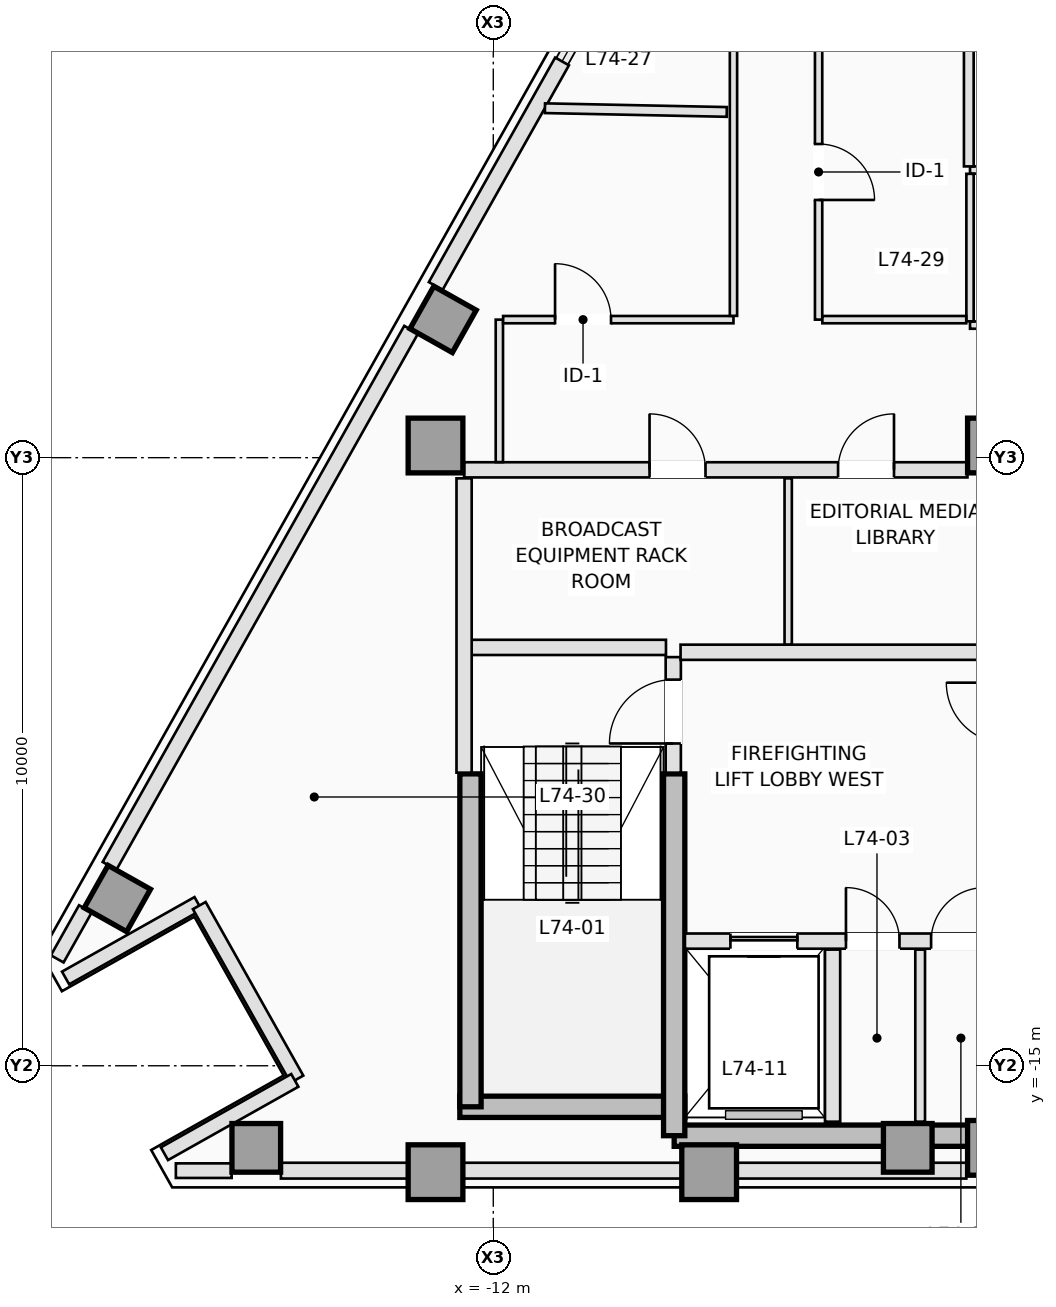
"""IFC4 building model, lengths in metres.
Left out: names, types, materials, properties, quantities, classifications, styles, units other than length and angle.
Written with IfcOpenShell. Run it as: python <this file> out.ifc"""

import sys

from ifc_helpers import new_model, si_unit, direction, frame, frame_2d, origin, origin_2d, place, context, subcontext, project, spatial, rectangle, extrude, element, fill, save


model = new_model("IFC4")
c1 = context("Model", 3, precision=1e-05, world=origin(), true_north=direction((0.0, 1.0)))
c2 = subcontext(c1, "Body", "Model", "MODEL_VIEW")
j1 = project(units=[si_unit("LENGTHUNIT", "METRE"), si_unit("PLANEANGLEUNIT", "RADIAN")], contexts=[c1])
p1 = place(None, origin())
s1 = spatial("IfcSite", under=j1, at=p1, CompositionType="ELEMENT")
p2 = place(p1, origin())
s2 = spatial("IfcBuilding", under=s1, at=p2, CompositionType="ELEMENT")
p3 = place(p2, frame((0.0, 0.0, 267.4)))
s3 = spatial("IfcBuildingStorey", under=s2, at=p3, CompositionType="ELEMENT", Elevation=267.4)
p4 = place(p3, frame((-12.55, -15.675, 0.0), z_axis=(0.0, 0.0, 1.0), x_axis=(1.0, 0.0, 0.0)))
e1 = element("IfcWall", 1, at=p4, inside=s3, PredefinedType="SHEAR", context=c2, shape_type="SweptSolid", body=[
    extrude(rectangle(XDim=3.7, YDim=0.35, at=frame_2d((1.85, 0.0))), origin(), (0.0, 0.0, 1.0), 3.5),
])
p5 = place(p3, frame((-9.025, -16.15, 0.0), z_axis=(0.0, 0.0, 1.0), x_axis=(1.0, 0.0, 0.0)))
e2 = element("IfcWall", 2, at=p5, inside=s3, PredefinedType="SHEAR", context=c2, shape_type="SweptSolid", body=[
    extrude(rectangle(XDim=5.275, YDim=0.35, at=frame_2d((2.637, 0.0))), origin(), (0.0, 0.0, 1.0), 3.5),
])
p6 = place(p3, frame((-12.375, -15.675, 0.0), z_axis=(0.0, 0.0, 1.0), x_axis=(0.0, 1.0, 0.0)))
e3 = element("IfcWall", 3, at=p6, inside=s3, PredefinedType="SHEAR", context=c2, shape_type="SweptSolid", body=[
    extrude(rectangle(XDim=5.475, YDim=0.35, at=frame_2d((2.738, 0.0))), origin(), (0.0, 0.0, 1.0), 3.5),
])
p7 = place(p3, frame((-9.025, -16.15, 0.0), z_axis=(0.0, 0.0, 1.0), x_axis=(0.0, 1.0, 0.0)))
e4 = element("IfcWall", 4, at=p7, inside=s3, PredefinedType="SHEAR", context=c2, shape_type="SweptSolid", body=[
    extrude(rectangle(XDim=5.95, YDim=0.35, at=frame_2d((2.975, 0.0))), origin(), (0.0, 0.0, 1.0), 3.5),
])
for number, where, z_axis, x_axis in (
    (5, (-12.95, -16.75, 0.0), (0.0, 0.0, 1.0), (1.0, 0.0, 0.0)),
    (6, (-8.45, -16.75, 0.0), (0.0, 0.0, 1.0), (1.0, 0.0, 0.0)),
    (7, (-3.75, -16.35, 0.0), (0.0, 0.0, 1.0), (1.0, 0.0, 0.0)),
    (8, (-12.95, -4.8, 0.0), (0.0, 0.0, 1.0), (1.0, 0.0, 0.0)),
    (9, (-3.75, -4.8, 0.0), (0.0, 0.0, 1.0), (1.0, 0.0, 0.0)),
):
    element("IfcColumn", number, at=place(p3, frame(where, z_axis=z_axis, x_axis=x_axis)), inside=s3, PredefinedType="COLUMN", context=c2, shape_type="SweptSolid", body=[
        extrude(rectangle(XDim=0.9, YDim=0.9, at=origin_2d()), origin(), (0.0, 0.0, 1.0), 3.5),
    ])
for number, where, z_axis, x_axis in (
    (10, (-15.898, -16.35, 0.0), (0.0, 0.0, 1.0), (0.0, 1.0, 0.0)),
    (11, (-5.184, -16.35, 0.0), (0.0, 0.0, 1.0), (0.0, 1.0, 0.0)),
    (12, (-12.825, -2.727, 0.0), (0.0, 0.0, 1.0), (-0.872, 0.49, 0.0)),
    (13, (-18.182, -12.25, 0.0), (0.0, 0.0, 1.0), (-0.872, 0.49, 0.0)),
):
    element("IfcColumn", number, at=place(p3, frame(where, z_axis=z_axis, x_axis=x_axis)), inside=s3, PredefinedType="COLUMN", context=c2, shape_type="SweptSolid", body=[
        extrude(rectangle(XDim=0.8, YDim=0.8, at=origin_2d()), origin(), (0.0, 0.0, 1.0), 3.5),
    ])
p8 = place(p3, frame((-16.302, -16.725, 0.0), z_axis=(0.0, 0.0, 1.0), x_axis=(-1.0, 0.0, 0.0)))
e14 = element("IfcWall", 14, at=p8, inside=s3, PredefinedType="STANDARD", context=c2, shape_type="SweptSolid", body=[
    extrude(rectangle(XDim=0.917, YDim=0.24, at=frame_2d((0.459, 0.0))), origin(), (0.0, 0.0, 1.0), 3.18),
])
p9 = place(p3, frame((-4.22, -16.725, 0.0), z_axis=(0.0, 0.0, 1.0), x_axis=(-1.0, 0.0, 0.0)))
e15 = element("IfcWall", 15, at=p9, inside=s3, PredefinedType="STANDARD", context=c2, shape_type="SweptSolid", body=[
    extrude(rectangle(XDim=11.273, YDim=0.26, at=frame_2d((5.636, 0.0))), origin(), (0.0, 0.0, 1.0), 2.72),
])
p10 = place(p3, frame((-19.171, -13.242, 0.0), z_axis=(0.0, 0.0, 1.0), x_axis=(0.490199895283, 0.871610040479, 0.0)))
e16 = element("IfcWall", 16, at=p10, inside=s3, PredefinedType="STANDARD", context=c2, shape_type="SweptSolid", body=[
    extrude(rectangle(XDim=0.945, YDim=0.24, at=frame_2d((0.472, 0.0))), origin(), (0.0, 0.0, 1.0), 3.18),
])
p11 = place(p3, frame((-18.311, -11.713, 0.0), z_axis=(0.0, 0.0, 1.0), x_axis=(0.490266968583, 0.871572314565, 0.0)))
e17 = element("IfcWall", 17, at=p11, inside=s3, PredefinedType="STANDARD", context=c2, shape_type="SweptSolid", body=[
    extrude(rectangle(XDim=10.116, YDim=0.26, at=frame_2d((5.058, 0.0))), origin(), (0.0, 0.0, 1.0), 3.18),
])
p12 = place(p3, frame((-12.946, -2.177, 0.0), z_axis=(0.0, 0.0, 1.0), x_axis=(0.490244825075, 0.871584770109, 0.0)))
e18 = element("IfcWall", 18, at=p12, inside=s3, PredefinedType="STANDARD", context=c2, shape_type="SweptSolid", body=[
    extrude(rectangle(XDim=4.237, YDim=0.26, at=frame_2d((2.119, 0.0))), origin(), (0.0, 0.0, 1.0), 3.18),
])
p13 = place(p3, frame((-19.033, -13.556, 0.0), z_axis=(0.0, 0.0, 1.0), x_axis=(0.871588577066, 0.490238056792, 0.0)))
e19 = element("IfcWall", 19, at=p13, inside=s3, PredefinedType="STANDARD", context=c2, shape_type="SweptSolid", body=[
    extrude(rectangle(XDim=2.5, YDim=0.24, at=frame_2d((1.25, 0.0))), origin(), (0.0, 0.0, 1.0), 3.18),
])
p14 = place(p3, frame((-16.835, -12.366, 0.0), z_axis=(0.0, 0.0, 1.0), x_axis=(0.490293083368, -0.871557624258, 0.0)))
e20 = element("IfcWall", 20, at=p14, inside=s3, PredefinedType="STANDARD", context=c2, shape_type="SweptSolid", body=[
    extrude(rectangle(XDim=3.276, YDim=0.24, at=frame_2d((1.638, 0.0))), origin(), (0.0, 0.0, 1.0), 2.72),
])
p15 = place(p3, frame((-15.264, -15.24, 0.0), z_axis=(0.0, 0.0, 1.0), x_axis=(-0.87157023615, -0.490270663468, 0.0)))
e21 = element("IfcWall", 21, at=p15, inside=s3, PredefinedType="STANDARD", context=c2, shape_type="SweptSolid", body=[
    extrude(rectangle(XDim=2.46, YDim=0.24, at=frame_2d((1.23, 0.0))), origin(), (0.0, 0.0, 1.0), 3.18),
])
p16 = place(p3, frame((-9.04, -10.18, 0.0), z_axis=(0.0, 0.0, 1.0), x_axis=(0.0, 1.0, 0.0)))
e22 = element("IfcWall", 22, at=p16, inside=s3, PredefinedType="PARTITIONING", context=c2, shape_type="SweptSolid", body=[
    extrude(rectangle(XDim=1.9, YDim=0.25, at=frame_2d((0.95, 0.0))), origin(), (0.0, 0.0, 1.0), 3.18),
])
p17 = place(p16, frame((0.48, 0.0, 0.0)))
e23 = element("IfcOpeningElement", 23, at=p17, cuts=e22, PredefinedType="OPENING", context=c2, shape_type="SweptSolid", body=[
    extrude(rectangle(XDim=1.05, YDim=2.15, at=frame_2d((0.525, 1.075))), frame((0.0, 0.135, 0.0), z_axis=(0.0, -1.0, 0.0), x_axis=(1.0, 0.0, 0.0)), (0.0, 0.0, 1.0), 0.27),
])
p18 = place(p3, frame((-12.38, -8.12, 0.0), z_axis=(0.0, 0.0, 1.0), x_axis=(1.0, 0.0, 0.0)))
e24 = element("IfcWall", 24, at=p18, inside=s3, PredefinedType="PARTITIONING", context=c2, shape_type="SweptSolid", body=[
    extrude(rectangle(XDim=3.22, YDim=0.25, at=frame_2d((1.61, 0.0))), origin(), (0.0, 0.0, 1.0), 3.18),
])
p19 = place(p3, frame((-12.48, -10.18, 0.0), z_axis=(0.0, 0.0, 1.0), x_axis=(0.0, 1.0, 0.0)))
e25 = element("IfcWall", 25, at=p19, inside=s3, PredefinedType="PARTITIONING", context=c2, shape_type="SweptSolid", body=[
    extrude(rectangle(XDim=4.84, YDim=0.25, at=frame_2d((2.42, 0.0))), origin(), (0.0, 0.0, 1.0), 3.18),
])
p20 = place(p3, frame((-8.848, -12.95, 0.0), z_axis=(0.0, 0.0, 1.0), x_axis=(1.0, 0.0, 0.0)))
e26 = element("IfcWall", 26, at=p20, inside=s3, PredefinedType="PARTITIONING", context=c2, shape_type="SweptSolid", body=[
    extrude(rectangle(XDim=5.168, YDim=0.25, at=frame_2d((2.584, 0.0))), origin(), (0.0, 0.0, 1.0), 3.18),
])
p21 = place(p20, frame((0.748, 0.0, 0.0)))
e27 = element("IfcOpeningElement", 27, at=p21, cuts=e26, PredefinedType="OPENING", context=c2, shape_type="SweptSolid", body=[
    extrude(rectangle(XDim=1.1, YDim=2.15, at=frame_2d((0.55, 1.075))), frame((0.0, 0.135, 0.0), z_axis=(0.0, -1.0, 0.0), x_axis=(1.0, 0.0, 0.0)), (0.0, 0.0, 1.0), 0.27),
])
p22 = place(p20, frame((2.648, 0.0, 0.0)))
e28 = element("IfcOpeningElement", 28, at=p22, cuts=e26, PredefinedType="OPENING", context=c2, shape_type="SweptSolid", body=[
    extrude(rectangle(XDim=0.88, YDim=2.1, at=frame_2d((0.44, 1.05))), frame((0.0, 0.135, 0.0), z_axis=(0.0, -1.0, 0.0), x_axis=(1.0, 0.0, 0.0)), (0.0, 0.0, 1.0), 0.27),
])
p23 = place(p20, frame((4.048, 0.0, 0.0)))
e29 = element("IfcOpeningElement", 29, at=p23, cuts=e26, PredefinedType="OPENING", context=c2, shape_type="SweptSolid", body=[
    extrude(rectangle(XDim=0.88, YDim=2.1, at=frame_2d((0.44, 1.05))), frame((0.0, 0.135, 0.0), z_axis=(0.0, -1.0, 0.0), x_axis=(1.0, 0.0, 0.0)), (0.0, 0.0, 1.0), 0.27),
])
p24 = place(p3, frame((-6.42, -15.92, 0.0), z_axis=(0.0, 0.0, 1.0), x_axis=(0.0, 1.0, 0.0)))
e30 = element("IfcWall", 30, at=p24, inside=s3, PredefinedType="PARTITIONING", context=c2, shape_type="SweptSolid", body=[
    extrude(rectangle(XDim=2.83, YDim=0.25, at=frame_2d((1.415, 0.0))), origin(), (0.0, 0.0, 1.0), 3.18),
])
p25 = place(p3, frame((-4.98, -15.92, 0.0), z_axis=(0.0, 0.0, 1.0), x_axis=(0.0, 1.0, 0.0)))
e31 = element("IfcWall", 31, at=p25, inside=s3, PredefinedType="PARTITIONING", context=c2, shape_type="SweptSolid", body=[
    extrude(rectangle(XDim=2.83, YDim=0.16, at=frame_2d((1.415, 0.0))), origin(), (0.0, 0.0, 1.0), 3.18),
])
p26 = place(p3, frame((-8.92, -8.2, 0.0), z_axis=(0.0, 0.0, 1.0), x_axis=(1.0, 0.0, 0.0)))
e32 = element("IfcWall", 32, at=p26, inside=s3, PredefinedType="PARTITIONING", context=c2, shape_type="SweptSolid", body=[
    extrude(rectangle(XDim=5.24, YDim=0.25, at=frame_2d((2.62, 0.0))), origin(), (0.0, 0.0, 1.0), 3.18),
])
p27 = place(p3, frame((-12.48, -5.2, 0.0), z_axis=(0.0, 0.0, 1.0), x_axis=(1.0, 0.0, 0.0)))
e33 = element("IfcWall", 33, at=p27, inside=s3, PredefinedType="PARTITIONING", context=c2, shape_type="SweptSolid", body=[
    extrude(rectangle(XDim=8.278, YDim=0.25, at=frame_2d((4.139, 0.0))), origin(), (0.0, 0.0, 1.0), 3.18),
])
p28 = place(p27, frame((3.05, 0.0, 0.0)))
e34 = element("IfcOpeningElement", 34, at=p28, cuts=e33, PredefinedType="OPENING", context=c2, shape_type="SweptSolid", body=[
    extrude(rectangle(XDim=0.92, YDim=2.12, at=frame_2d((0.46, 1.06))), frame((0.0, 0.135, 0.0), z_axis=(0.0, -1.0, 0.0), x_axis=(1.0, 0.0, 0.0)), (0.0, 0.0, 1.0), 0.27),
])
p29 = place(p27, frame((6.15, 0.0, 0.0)))
e35 = element("IfcOpeningElement", 35, at=p29, cuts=e33, PredefinedType="OPENING", context=c2, shape_type="SweptSolid", body=[
    extrude(rectangle(XDim=0.92, YDim=2.12, at=frame_2d((0.46, 1.06))), frame((0.0, 0.135, 0.0), z_axis=(0.0, -1.0, 0.0), x_axis=(1.0, 0.0, 0.0)), (0.0, 0.0, 1.0), 0.27),
])
p30 = place(p3, frame((-7.15, -8.073, 0.0), z_axis=(0.0, 0.0, 1.0), x_axis=(0.0, 1.0, 0.0)))
e36 = element("IfcWall", 36, at=p30, inside=s3, PredefinedType="PARTITIONING", context=c2, shape_type="SweptSolid", body=[
    extrude(rectangle(XDim=2.733, YDim=0.12, at=frame_2d((1.366, 0.0))), origin(), (0.0, 0.0, 1.0), 3.18),
])
p31 = place(p3, frame((-4.16, -2.82, 0.0), z_axis=(0.0, 0.0, 1.0), x_axis=(1.0, 0.0, 0.0)))
e37 = element("IfcWall", 37, at=p31, inside=s3, PredefinedType="PARTITIONING", context=c2, shape_type="SweptSolid", body=[
    extrude(rectangle(XDim=2.62, YDim=0.12, at=frame_2d((1.31, 0.0))), origin(), (0.0, 0.0, 1.0), 2.873),
])
p32 = place(p31, frame((0.82, 0.0, 0.0)))
e38 = element("IfcOpeningElement", 38, at=p32, cuts=e37, PredefinedType="OPENING", context=c2, shape_type="SweptSolid", body=[
    extrude(rectangle(XDim=0.9, YDim=2.12, at=frame_2d((0.45, 1.06))), frame((0.0, 0.07, 0.0), z_axis=(0.0, -1.0, 0.0), x_axis=(1.0, 0.0, 0.0)), (0.0, 0.0, 1.0), 0.14),
])
p33 = place(p3, frame((-4.16, -0.27, 0.0), z_axis=(0.0, 0.0, 1.0), x_axis=(1.0, 0.0, 0.0)))
e39 = element("IfcWall", 39, at=p33, inside=s3, PredefinedType="PARTITIONING", context=c2, shape_type="SweptSolid", body=[
    extrude(rectangle(XDim=2.62, YDim=0.12, at=frame_2d((1.31, 0.0))), origin(), (0.0, 0.0, 1.0), 3.18),
])
p34 = place(p3, frame((-4.16, -2.758, 0.0), z_axis=(0.0, 0.0, 1.0), x_axis=(0.0, 1.0, 0.0)))
e40 = element("IfcWall", 40, at=p34, inside=s3, PredefinedType="PARTITIONING", context=c2, shape_type="SweptSolid", body=[
    extrude(rectangle(XDim=2.426, YDim=0.12, at=frame_2d((1.213, 0.0))), origin(), (0.0, 0.0, 1.0), 3.18),
])
p35 = place(p3, frame((-11.9, -5.073, 0.0), z_axis=(0.0, 0.0, 1.0), x_axis=(0.0, 1.0, 0.0)))
e41 = element("IfcWall", 41, at=p35, inside=s3, PredefinedType="PARTITIONING", context=c2, shape_type="SweptSolid", body=[
    extrude(rectangle(XDim=2.343, YDim=0.12, at=frame_2d((1.171, 0.0))), origin(), (0.0, 0.0, 1.0), 3.18),
])
p36 = place(p3, frame((-11.838, -2.73, 0.0), z_axis=(0.0, 0.0, 1.0), x_axis=(1.0, 0.0, 0.0)))
e42 = element("IfcWall", 42, at=p36, inside=s3, PredefinedType="PARTITIONING", context=c2, shape_type="SweptSolid", body=[
    extrude(rectangle(XDim=3.788, YDim=0.12, at=frame_2d((1.894, 0.0))), origin(), (0.0, 0.0, 1.0), 3.18),
])
p37 = place(p36, frame((0.854, 0.0, 0.0)))
e43 = element("IfcOpeningElement", 43, at=p37, cuts=e42, PredefinedType="OPENING", context=c2, shape_type="SweptSolid", body=[
    extrude(rectangle(XDim=0.92, YDim=2.12, at=frame_2d((0.46, 1.06))), frame((0.0, 0.07, 0.0), z_axis=(0.0, -1.0, 0.0), x_axis=(1.0, 0.0, 0.0)), (0.0, 0.0, 1.0), 0.14),
])
p38 = place(p3, frame((-8.05, -2.668, 0.0), z_axis=(0.0, 0.0, 1.0), x_axis=(0.0, 1.0, 0.0)))
e44 = element("IfcWall", 44, at=p38, inside=s3, PredefinedType="PARTITIONING", context=c2, shape_type="SweptSolid", body=[
    extrude(rectangle(XDim=6.922, YDim=0.12, at=frame_2d((3.461, 0.0))), origin(), (0.0, 0.0, 1.0), 3.18),
])
p39 = place(p38, frame((4.581, 0.0, 0.0)))
e45 = element("IfcOpeningElement", 45, at=p39, cuts=e44, PredefinedType="OPENING", context=c2, shape_type="SweptSolid", body=[
    extrude(rectangle(XDim=0.92, YDim=2.12, at=frame_2d((0.46, 1.06))), frame((0.0, 0.07, 0.0), z_axis=(0.0, -1.0, 0.0), x_axis=(1.0, 0.0, 0.0)), (0.0, 0.0, 1.0), 0.14),
])
p40 = place(p3, frame((-6.65, 6.616, 0.0), z_axis=(0.0, 0.0, 1.0), x_axis=(0.0, -1.0, 0.0)))
e46 = element("IfcWall", 46, at=p40, inside=s3, PredefinedType="PARTITIONING", context=c2, shape_type="SweptSolid", body=[
    extrude(rectangle(XDim=9.346, YDim=0.12, at=frame_2d((4.673, 0.0))), origin(), (0.0, 0.0, 1.0), 3.18),
])
p41 = place(p40, frame((2.822, 0.0, 0.0)))
e47 = element("IfcOpeningElement", 47, at=p41, cuts=e46, PredefinedType="OPENING", context=c2, shape_type="SweptSolid", body=[
    extrude(rectangle(XDim=0.92, YDim=2.12, at=frame_2d((0.46, 1.06))), frame((0.0, 0.07, 0.0), z_axis=(0.0, -1.0, 0.0), x_axis=(1.0, 0.0, 0.0)), (0.0, 0.0, 1.0), 0.14),
])
p42 = place(p40, frame((6.458, 0.0, 0.0)))
e48 = element("IfcOpeningElement", 48, at=p42, cuts=e46, PredefinedType="OPENING", context=c2, shape_type="SweptSolid", body=[
    extrude(rectangle(XDim=0.92, YDim=2.12, at=frame_2d((0.46, 1.06))), frame((0.0, 0.07, 0.0), z_axis=(0.0, -1.0, 0.0), x_axis=(1.0, 0.0, 0.0)), (0.0, 0.0, 1.0), 0.14),
])
p43 = place(p3, frame((-6.588, -2.73, 0.0), z_axis=(0.0, 0.0, 1.0), x_axis=(1.0, 0.0, 0.0)))
e49 = element("IfcWall", 49, at=p43, inside=s3, PredefinedType="PARTITIONING", context=c2, shape_type="SweptSolid", body=[
    extrude(rectangle(XDim=2.366, YDim=0.12, at=frame_2d((1.183, 0.0))), origin(), (0.0, 0.0, 1.0), 3.18),
])
p44 = place(p3, frame((-4.18, -0.21, 0.0), z_axis=(0.0, 0.0, 1.0), x_axis=(0.0, 1.0, 0.0)))
e50 = element("IfcWall", 50, at=p44, inside=s3, PredefinedType="PARTITIONING", context=c2, shape_type="SweptSolid", body=[
    extrude(rectangle(XDim=4.87, YDim=0.16, at=frame_2d((2.435, 0.0))), origin(), (0.0, 0.0, 1.0), 3.18),
])
p45 = place(p3, frame((-8.16, 0.686, 0.0), z_axis=(0.0, 0.0, 1.0), x_axis=(-0.999790115951, 0.020487167859, 0.0)))
e51 = element("IfcWall", 51, at=p45, inside=s3, PredefinedType="PARTITIONING", context=c2, shape_type="SweptSolid", body=[
    extrude(rectangle(XDim=2.991, YDim=0.16, at=frame_2d((1.496, 0.0))), origin(), (0.0, 0.0, 1.0), 3.18),
])
p46 = place(p21, origin())
e52 = element("IfcDoor", 52, at=p46, inside=s3, OperationType="SLIDING_TO_LEFT", PredefinedType="DOOR", context=c2, shape_type="SweptSolid", body=[
    extrude(rectangle(XDim=1.1, YDim=2.15, at=frame_2d((0.55, 1.075))), frame((0.0, 0.025, 0.0), z_axis=(0.0, -1.0, 0.0), x_axis=(1.0, 0.0, 0.0)), (0.0, 0.0, 1.0), 0.05),
])
fill(e27, e52)
p47 = place(p17, origin())
e53 = element("IfcDoor", 53, at=p47, inside=s3, OperationType="SINGLE_SWING_LEFT", PredefinedType="DOOR", context=c2, shape_type="SweptSolid", body=[
    extrude(rectangle(XDim=1.05, YDim=2.15, at=frame_2d((0.525, 1.075))), frame((0.0, 0.025, 0.0), z_axis=(0.0, -1.0, 0.0), x_axis=(1.0, 0.0, 0.0)), (0.0, 0.0, 1.0), 0.05),
])
fill(e23, e53)
p48 = place(p22, origin())
e54 = element("IfcDoor", 54, at=p48, inside=s3, OperationType="SINGLE_SWING_LEFT", PredefinedType="TRAPDOOR", context=c2, shape_type="SweptSolid", body=[
    extrude(rectangle(XDim=0.88, YDim=2.1, at=frame_2d((0.44, 1.05))), frame((0.0, 0.025, 0.0), z_axis=(0.0, -1.0, 0.0), x_axis=(1.0, 0.0, 0.0)), (0.0, 0.0, 1.0), 0.05),
])
fill(e28, e54)
p49 = place(p23, origin())
e55 = element("IfcDoor", 55, at=p49, inside=s3, OperationType="SINGLE_SWING_RIGHT", PredefinedType="TRAPDOOR", context=c2, shape_type="SweptSolid", body=[
    extrude(rectangle(XDim=0.88, YDim=2.1, at=frame_2d((0.44, 1.05))), frame((0.0, 0.025, 0.0), z_axis=(0.0, -1.0, 0.0), x_axis=(1.0, 0.0, 0.0)), (0.0, 0.0, 1.0), 0.05),
])
fill(e29, e55)
p50 = place(p28, origin())
e56 = element("IfcDoor", 56, at=p50, inside=s3, OperationType="SINGLE_SWING_LEFT", PredefinedType="DOOR", context=c2, shape_type="SweptSolid", body=[
    extrude(rectangle(XDim=0.92, YDim=2.12, at=frame_2d((0.46, 1.06))), frame((0.0, 0.025, 0.0), z_axis=(0.0, -1.0, 0.0), x_axis=(1.0, 0.0, 0.0)), (0.0, 0.0, 1.0), 0.05),
])
fill(e34, e56)
p51 = place(p29, origin())
e57 = element("IfcDoor", 57, at=p51, inside=s3, OperationType="SINGLE_SWING_RIGHT", PredefinedType="DOOR", context=c2, shape_type="SweptSolid", body=[
    extrude(rectangle(XDim=0.92, YDim=2.12, at=frame_2d((0.46, 1.06))), frame((0.0, 0.025, 0.0), z_axis=(0.0, -1.0, 0.0), x_axis=(1.0, 0.0, 0.0)), (0.0, 0.0, 1.0), 0.05),
])
fill(e35, e57)
p52 = place(p42, origin())
e58 = element("IfcDoor", 58, at=p52, inside=s3, OperationType="SINGLE_SWING_RIGHT", PredefinedType="DOOR", context=c2, shape_type="SweptSolid", body=[
    extrude(rectangle(XDim=0.92, YDim=2.12, at=frame_2d((0.46, 1.06))), frame((0.0, 0.025, 0.0), z_axis=(0.0, -1.0, 0.0), x_axis=(1.0, 0.0, 0.0)), (0.0, 0.0, 1.0), 0.05),
])
fill(e48, e58)
p53 = place(p37, origin())
e59 = element("IfcDoor", 59, at=p53, inside=s3, OperationType="SINGLE_SWING_LEFT", PredefinedType="DOOR", context=c2, shape_type="SweptSolid", body=[
    extrude(rectangle(XDim=0.92, YDim=2.12, at=frame_2d((0.46, 1.06))), frame((0.0, 0.025, 0.0), z_axis=(0.0, -1.0, 0.0), x_axis=(1.0, 0.0, 0.0)), (0.0, 0.0, 1.0), 0.05),
])
fill(e43, e59)
save(model, sys.argv[1])
